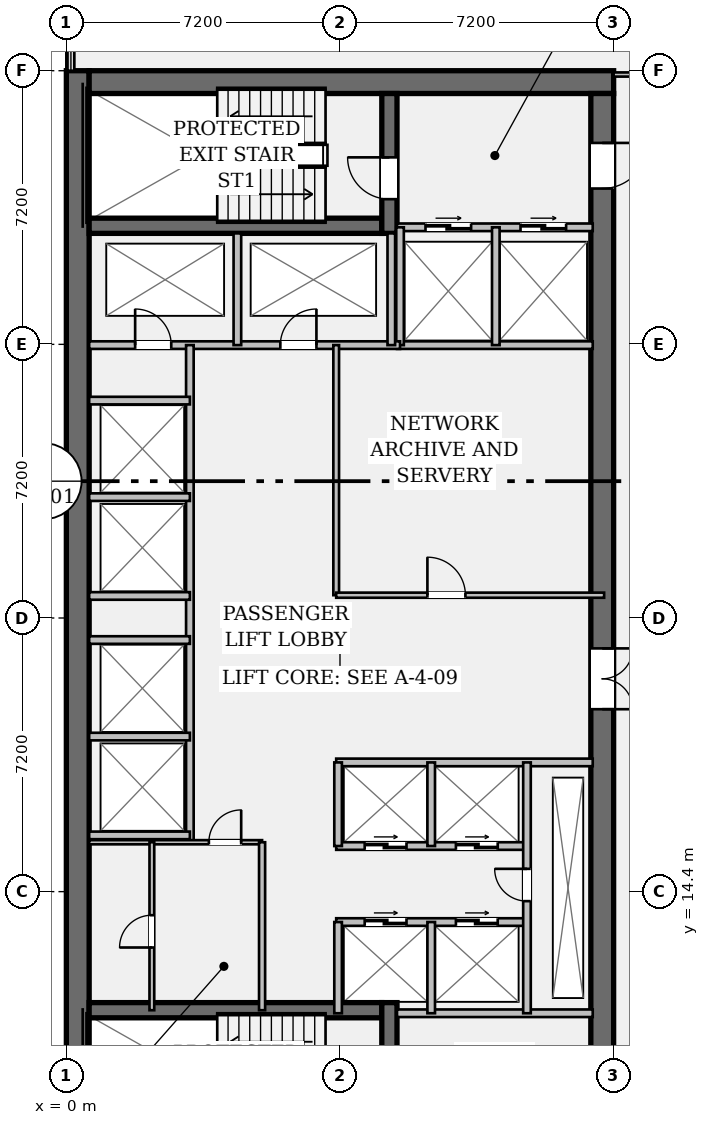
"""IFC4 building model, lengths in metres.
Left out: names, types, materials, properties, quantities, classifications, styles, units other than length and angle.
Written with IfcOpenShell. Run it as: python <this file> out.ifc"""

import sys

from ifc_helpers import new_model, si_unit, direction, frame, frame_2d, origin, place, context, subcontext, project, spatial, rectangle, extrude, element, fill, save


model = new_model("IFC4")
c1 = context("Model", 3, precision=1e-05, world=origin(), true_north=direction((0.0, 1.0)))
c2 = subcontext(c1, "Body", "Model", "MODEL_VIEW")
j1 = project(units=[si_unit("LENGTHUNIT", "METRE"), si_unit("PLANEANGLEUNIT", "RADIAN")], contexts=[c1])
p1 = place(None, origin())
s1 = spatial("IfcSite", under=j1, at=p1, CompositionType="ELEMENT")
p2 = place(p1, origin())
s2 = spatial("IfcBuilding", under=s1, at=p2, CompositionType="ELEMENT")
p3 = place(p2, frame((0.0, 0.0, 144.55)))
s3 = spatial("IfcBuildingStorey", under=s2, at=p3, CompositionType="ELEMENT", Elevation=144.55)
p4 = place(p3, frame((0.3, 7.2, 0.0), z_axis=(0.0, 0.0, 1.0), x_axis=(0.0, 1.0, 0.0)))
e1 = element("IfcWall", 1, at=p4, inside=s3, PredefinedType="SHEAR", context=c2, shape_type="SweptSolid", body=[
    extrude(rectangle(XDim=28.8, YDim=0.6, at=frame_2d((14.4, 0.0))), origin(), (0.0, 0.0, 1.0), 3.58),
])
p5 = place(p3, frame((0.6, 35.7, 0.0), z_axis=(0.0, 0.0, 1.0), x_axis=(1.0, 0.0, 0.0)))
e2 = element("IfcWall", 2, at=p5, inside=s3, PredefinedType="SHEAR", context=c2, shape_type="SweptSolid", body=[
    extrude(rectangle(XDim=13.8, YDim=0.6, at=frame_2d((6.9, 0.0))), origin(), (0.0, 0.0, 1.0), 3.58),
])
p6 = place(p3, frame((14.1, 35.4, 0.0), z_axis=(0.0, 0.0, 1.0), x_axis=(0.0, -1.0, 0.0)))
e3 = element("IfcWall", 3, at=p6, inside=s3, PredefinedType="SHEAR", context=c2, shape_type="SweptSolid", body=[
    extrude(rectangle(XDim=27.6, YDim=0.6, at=frame_2d((13.8, 0.0))), origin(), (0.0, 0.0, 1.0), 3.58),
])
p7 = place(p6, frame((1.3, 0.0, 0.0)))
e4 = element("IfcOpeningElement", 4, at=p7, cuts=e3, PredefinedType="OPENING", context=c2, shape_type="SweptSolid", body=[
    extrude(rectangle(XDim=1.2, YDim=2.15, at=frame_2d((0.6, 1.075))), frame((0.0, 0.312, 0.0), z_axis=(0.0, -1.0, 0.0), x_axis=(1.0, 0.0, 0.0)), (0.0, 0.0, 1.0), 0.624),
])
p8 = place(p6, frame((25.25, 0.0, 0.0)))
e5 = element("IfcOpeningElement", 5, at=p8, cuts=e3, PredefinedType="OPENING", context=c2, shape_type="SweptSolid", body=[
    extrude(rectangle(XDim=1.2, YDim=2.15, at=frame_2d((0.6, 1.075))), frame((0.0, 0.312, 0.0), z_axis=(0.0, -1.0, 0.0), x_axis=(1.0, 0.0, 0.0)), (0.0, 0.0, 1.0), 0.624),
])
p9 = place(p6, frame((14.6, 0.0, 0.0)))
e6 = element("IfcOpeningElement", 6, at=p9, cuts=e3, PredefinedType="OPENING", context=c2, shape_type="SweptSolid", body=[
    extrude(rectangle(XDim=1.6, YDim=2.2, at=frame_2d((0.8, 1.1))), frame((0.0, 0.312, 0.0), z_axis=(0.0, -1.0, 0.0), x_axis=(1.0, 0.0, 0.0)), (0.0, 0.0, 1.0), 0.624),
])
for number, where, z_axis, x_axis in (
    (7, (0.6, 31.92, 0.0), (0.0, 0.0, 1.0), (1.0, 0.0, 0.0)),
    (8, (0.6, 11.28, 0.0), (0.0, 0.0, 1.0), (1.0, 0.0, 0.0)),
):
    element("IfcWall", number, at=place(p3, frame(where, z_axis=z_axis, x_axis=x_axis)), inside=s3, PredefinedType="SHEAR", context=c2, shape_type="SweptSolid", body=[
        extrude(rectangle(XDim=7.7, YDim=0.4, at=frame_2d((3.85, 0.0))), origin(), (0.0, 0.0, 1.0), 3.58),
    ])
p10 = place(p3, frame((8.5, 31.72, 0.0), z_axis=(0.0, 0.0, 1.0), x_axis=(0.0, 1.0, 0.0)))
e9 = element("IfcWall", 9, at=p10, inside=s3, PredefinedType="SHEAR", context=c2, shape_type="SweptSolid", body=[
    extrude(rectangle(XDim=3.68, YDim=0.4, at=frame_2d((1.84, 0.0))), origin(), (0.0, 0.0, 1.0), 3.58),
])
p11 = place(p10, frame((0.9, 0.0, 0.0)))
e10 = element("IfcOpeningElement", 10, at=p11, cuts=e9, PredefinedType="OPENING", context=c2, shape_type="SweptSolid", body=[
    extrude(rectangle(XDim=1.1, YDim=2.15, at=frame_2d((0.55, 1.075))), frame((0.0, 0.212, 0.0), z_axis=(0.0, -1.0, 0.0), x_axis=(1.0, 0.0, 0.0)), (0.0, 0.0, 1.0), 0.424),
])
p12 = place(p3, frame((8.5, 7.8, 0.0), z_axis=(0.0, 0.0, 1.0), x_axis=(0.0, 1.0, 0.0)))
e11 = element("IfcWall", 11, at=p12, inside=s3, PredefinedType="SHEAR", context=c2, shape_type="SweptSolid", body=[
    extrude(rectangle(XDim=3.68, YDim=0.4, at=frame_2d((1.84, 0.0))), origin(), (0.0, 0.0, 1.0), 3.58),
])
p13 = place(p12, frame((0.85, 0.0, 0.0)))
e12 = element("IfcOpeningElement", 12, at=p13, cuts=e11, PredefinedType="OPENING", context=c2, shape_type="SweptSolid", body=[
    extrude(rectangle(XDim=1.1, YDim=2.15, at=frame_2d((0.55, 1.075))), frame((0.0, 0.212, 0.0), z_axis=(0.0, -1.0, 0.0), x_axis=(1.0, 0.0, 0.0)), (0.0, 0.0, 1.0), 0.424),
])
p14 = place(p3, frame((8.7, 31.88, 0.0), z_axis=(0.0, 0.0, 1.0), x_axis=(1.0, 0.0, 0.0)))
e13 = element("IfcWall", 13, at=p14, inside=s3, PredefinedType="PARTITIONING", context=c2, shape_type="SweptSolid", body=[
    extrude(rectangle(XDim=5.15, YDim=0.2, at=frame_2d((2.575, 0.0))), origin(), (0.0, 0.0, 1.0), 3.58),
])
p15 = place(p14, frame((0.75, 0.0, 0.0)))
e14 = element("IfcOpeningElement", 14, at=p15, cuts=e13, PredefinedType="OPENING", context=c2, shape_type="SweptSolid", body=[
    extrude(rectangle(XDim=1.2, YDim=2.2, at=frame_2d((0.6, 1.1))), frame((0.0, 0.112, 0.0), z_axis=(0.0, -1.0, 0.0), x_axis=(1.0, 0.0, 0.0)), (0.0, 0.0, 1.0), 0.224),
])
p16 = place(p14, frame((3.25, 0.0, 0.0)))
e15 = element("IfcOpeningElement", 15, at=p16, cuts=e13, PredefinedType="OPENING", context=c2, shape_type="SweptSolid", body=[
    extrude(rectangle(XDim=1.2, YDim=2.2, at=frame_2d((0.6, 1.1))), frame((0.0, 0.112, 0.0), z_axis=(0.0, -1.0, 0.0), x_axis=(1.0, 0.0, 0.0)), (0.0, 0.0, 1.0), 0.224),
])
for number, where, z_axis, x_axis in (
    (16, (8.7, 11.2, 0.0), (0.0, 0.0, 1.0), (1.0, 0.0, 0.0)),
    (17, (8.7, 28.78, 0.0), (0.0, 0.0, 1.0), (1.0, 0.0, 0.0)),
):
    element("IfcWall", number, at=place(p3, frame(where, z_axis=z_axis, x_axis=x_axis)), inside=s3, PredefinedType="PARTITIONING", context=c2, shape_type="SweptSolid", body=[
        extrude(rectangle(XDim=5.15, YDim=0.2, at=frame_2d((2.575, 0.0))), origin(), (0.0, 0.0, 1.0), 3.58),
    ])
for number, where, z_axis, x_axis in (
    (18, (8.78, 28.78, 0.0), (0.0, 0.0, 1.0), (0.0, 1.0, 0.0)),
    (19, (11.3, 28.78, 0.0), (0.0, 0.0, 1.0), (0.0, 1.0, 0.0)),
):
    element("IfcWall", number, at=place(p3, frame(where, z_axis=z_axis, x_axis=x_axis)), inside=s3, PredefinedType="PARTITIONING", context=c2, shape_type="SweptSolid", body=[
        extrude(rectangle(XDim=3.1, YDim=0.2, at=frame_2d((1.55, 0.0))), origin(), (0.0, 0.0, 1.0), 3.58),
    ])
p17 = place(p3, frame((0.6, 28.78, 0.0), z_axis=(0.0, 0.0, 1.0), x_axis=(1.0, 0.0, 0.0)))
e20 = element("IfcWall", 20, at=p17, inside=s3, PredefinedType="PARTITIONING", context=c2, shape_type="SweptSolid", body=[
    extrude(rectangle(XDim=8.18, YDim=0.2, at=frame_2d((4.09, 0.0))), origin(), (0.0, 0.0, 1.0), 3.58),
])
p18 = place(p17, frame((1.21, 0.0, 0.0)))
e21 = element("IfcOpeningElement", 21, at=p18, cuts=e20, PredefinedType="OPENING", context=c2, shape_type="SweptSolid", body=[
    extrude(rectangle(XDim=0.95, YDim=2.15, at=frame_2d((0.475, 1.075))), frame((0.0, 0.112, 0.0), z_axis=(0.0, -1.0, 0.0), x_axis=(1.0, 0.0, 0.0)), (0.0, 0.0, 1.0), 0.224),
])
p19 = place(p17, frame((5.03, 0.0, 0.0)))
e22 = element("IfcOpeningElement", 22, at=p19, cuts=e20, PredefinedType="OPENING", context=c2, shape_type="SweptSolid", body=[
    extrude(rectangle(XDim=0.95, YDim=2.15, at=frame_2d((0.475, 1.075))), frame((0.0, 0.112, 0.0), z_axis=(0.0, -1.0, 0.0), x_axis=(1.0, 0.0, 0.0)), (0.0, 0.0, 1.0), 0.224),
])
for number, where, z_axis, x_axis in (
    (23, (4.5, 28.78, 0.0), (0.0, 0.0, 1.0), (0.0, 1.0, 0.0)),
    (24, (8.55, 28.78, 0.0), (0.0, 0.0, 1.0), (0.0, 1.0, 0.0)),
):
    element("IfcWall", number, at=place(p3, frame(where, z_axis=z_axis, x_axis=x_axis)), inside=s3, PredefinedType="PARTITIONING", context=c2, shape_type="SweptSolid", body=[
        extrude(rectangle(XDim=2.94, YDim=0.2, at=frame_2d((1.47, 0.0))), origin(), (0.0, 0.0, 1.0), 3.58),
    ])
p20 = place(p3, frame((3.25, 15.7, 0.0), z_axis=(0.0, 0.0, 1.0), x_axis=(0.0, 1.0, 0.0)))
e25 = element("IfcWall", 25, at=p20, inside=s3, PredefinedType="PARTITIONING", context=c2, shape_type="SweptSolid", body=[
    extrude(rectangle(XDim=13.08, YDim=0.2, at=frame_2d((6.54, 0.0))), origin(), (0.0, 0.0, 1.0), 3.58),
])
for number, where, z_axis, x_axis in (
    (26, (0.6, 15.88, 0.0), (0.0, 0.0, 1.0), (1.0, 0.0, 0.0)),
    (27, (0.6, 18.48, 0.0), (0.0, 0.0, 1.0), (1.0, 0.0, 0.0)),
    (28, (0.6, 22.18, 0.0), (0.0, 0.0, 1.0), (1.0, 0.0, 0.0)),
    (29, (0.6, 24.78, 0.0), (0.0, 0.0, 1.0), (1.0, 0.0, 0.0)),
    (30, (0.6, 21.02, 0.0), (0.0, 0.0, 1.0), (1.0, 0.0, 0.0)),
    (31, (0.6, 27.32, 0.0), (0.0, 0.0, 1.0), (1.0, 0.0, 0.0)),
):
    element("IfcWall", number, at=place(p3, frame(where, z_axis=z_axis, x_axis=x_axis)), inside=s3, PredefinedType="PARTITIONING", context=c2, shape_type="SweptSolid", body=[
        extrude(rectangle(XDim=2.65, YDim=0.2, at=frame_2d((1.325, 0.0))), origin(), (0.0, 0.0, 1.0), 3.58),
    ])
p21 = place(p3, frame((7.1, 22.2, 0.0), z_axis=(0.0, 0.0, 1.0), x_axis=(0.0, 1.0, 0.0)))
e32 = element("IfcWall", 32, at=p21, inside=s3, PredefinedType="PARTITIONING", context=c2, shape_type="SweptSolid", body=[
    extrude(rectangle(XDim=6.58, YDim=0.15, at=frame_2d((3.29, 0.0))), origin(), (0.0, 0.0, 1.0), 3.58),
])
p22 = place(p3, frame((7.1, 22.2, 0.0), z_axis=(0.0, 0.0, 1.0), x_axis=(1.0, 0.0, 0.0)))
e33 = element("IfcWall", 33, at=p22, inside=s3, PredefinedType="PARTITIONING", context=c2, shape_type="SweptSolid", body=[
    extrude(rectangle(XDim=7.05, YDim=0.135, at=frame_2d((3.525, 0.0))), origin(), (0.0, 0.0, 1.0), 3.58),
])
p23 = place(p22, frame((2.4, 0.0, 0.0)))
e34 = element("IfcOpeningElement", 34, at=p23, cuts=e33, PredefinedType="OPENING", context=c2, shape_type="SweptSolid", body=[
    extrude(rectangle(XDim=1.0, YDim=2.15, at=frame_2d((0.5, 1.075))), frame((0.0, 0.08, 0.0), z_axis=(0.0, -1.0, 0.0), x_axis=(1.0, 0.0, 0.0)), (0.0, 0.0, 1.0), 0.159),
])
p24 = place(p3, frame((7.1, 17.8, 0.0), z_axis=(0.0, 0.0, 1.0), x_axis=(1.0, 0.0, 0.0)))
e35 = element("IfcWall", 35, at=p24, inside=s3, PredefinedType="PARTITIONING", context=c2, shape_type="SweptSolid", body=[
    extrude(rectangle(XDim=6.75, YDim=0.2, at=frame_2d((3.375, 0.0))), origin(), (0.0, 0.0, 1.0), 3.58),
])
p25 = place(p3, frame((7.1, 15.6, 0.0), z_axis=(0.0, 0.0, 1.0), x_axis=(1.0, 0.0, 0.0)))
e36 = element("IfcWall", 36, at=p25, inside=s3, PredefinedType="PARTITIONING", context=c2, shape_type="SweptSolid", body=[
    extrude(rectangle(XDim=5.02, YDim=0.2, at=frame_2d((2.51, 0.0))), origin(), (0.0, 0.0, 1.0), 3.58),
])
p26 = place(p25, frame((0.75, 0.0, 0.0)))
e37 = element("IfcOpeningElement", 37, at=p26, cuts=e36, PredefinedType="OPENING", context=c2, shape_type="SweptSolid", body=[
    extrude(rectangle(XDim=1.1, YDim=2.2, at=frame_2d((0.55, 1.1))), frame((0.0, 0.112, 0.0), z_axis=(0.0, -1.0, 0.0), x_axis=(1.0, 0.0, 0.0)), (0.0, 0.0, 1.0), 0.224),
])
p27 = place(p25, frame((3.15, 0.0, 0.0)))
e38 = element("IfcOpeningElement", 38, at=p27, cuts=e36, PredefinedType="OPENING", context=c2, shape_type="SweptSolid", body=[
    extrude(rectangle(XDim=1.1, YDim=2.2, at=frame_2d((0.55, 1.1))), frame((0.0, 0.112, 0.0), z_axis=(0.0, -1.0, 0.0), x_axis=(1.0, 0.0, 0.0)), (0.0, 0.0, 1.0), 0.224),
])
p28 = place(p3, frame((7.1, 13.6, 0.0), z_axis=(0.0, 0.0, 1.0), x_axis=(1.0, 0.0, 0.0)))
e39 = element("IfcWall", 39, at=p28, inside=s3, PredefinedType="PARTITIONING", context=c2, shape_type="SweptSolid", body=[
    extrude(rectangle(XDim=5.02, YDim=0.2, at=frame_2d((2.51, 0.0))), origin(), (0.0, 0.0, 1.0), 3.58),
])
p29 = place(p28, frame((0.75, 0.0, 0.0)))
e40 = element("IfcOpeningElement", 40, at=p29, cuts=e39, PredefinedType="OPENING", context=c2, shape_type="SweptSolid", body=[
    extrude(rectangle(XDim=1.1, YDim=2.2, at=frame_2d((0.55, 1.1))), frame((0.0, 0.112, 0.0), z_axis=(0.0, -1.0, 0.0), x_axis=(1.0, 0.0, 0.0)), (0.0, 0.0, 1.0), 0.224),
])
p30 = place(p28, frame((3.15, 0.0, 0.0)))
e41 = element("IfcOpeningElement", 41, at=p30, cuts=e39, PredefinedType="OPENING", context=c2, shape_type="SweptSolid", body=[
    extrude(rectangle(XDim=1.1, YDim=2.2, at=frame_2d((0.55, 1.1))), frame((0.0, 0.112, 0.0), z_axis=(0.0, -1.0, 0.0), x_axis=(1.0, 0.0, 0.0)), (0.0, 0.0, 1.0), 0.224),
])
p31 = place(p3, frame((7.15, 15.6, 0.0), z_axis=(0.0, 0.0, 1.0), x_axis=(0.0, 1.0, 0.0)))
e42 = element("IfcWall", 42, at=p31, inside=s3, PredefinedType="PARTITIONING", context=c2, shape_type="SweptSolid", body=[
    extrude(rectangle(XDim=2.2, YDim=0.2, at=frame_2d((1.1, 0.0))), origin(), (0.0, 0.0, 1.0), 3.58),
])
p32 = place(p3, frame((7.15, 11.2, 0.0), z_axis=(0.0, 0.0, 1.0), x_axis=(0.0, 1.0, 0.0)))
e43 = element("IfcWall", 43, at=p32, inside=s3, PredefinedType="PARTITIONING", context=c2, shape_type="SweptSolid", body=[
    extrude(rectangle(XDim=2.4, YDim=0.2, at=frame_2d((1.2, 0.0))), origin(), (0.0, 0.0, 1.0), 3.58),
])
p33 = place(p3, frame((9.6, 15.6, 0.0), z_axis=(0.0, 0.0, 1.0), x_axis=(0.0, 1.0, 0.0)))
e44 = element("IfcWall", 44, at=p33, inside=s3, PredefinedType="PARTITIONING", context=c2, shape_type="SweptSolid", body=[
    extrude(rectangle(XDim=2.2, YDim=0.2, at=frame_2d((1.1, 0.0))), origin(), (0.0, 0.0, 1.0), 3.58),
])
p34 = place(p3, frame((9.6, 11.2, 0.0), z_axis=(0.0, 0.0, 1.0), x_axis=(0.0, 1.0, 0.0)))
e45 = element("IfcWall", 45, at=p34, inside=s3, PredefinedType="PARTITIONING", context=c2, shape_type="SweptSolid", body=[
    extrude(rectangle(XDim=2.4, YDim=0.2, at=frame_2d((1.2, 0.0))), origin(), (0.0, 0.0, 1.0), 3.58),
])
p35 = place(p3, frame((12.12, 11.2, 0.0), z_axis=(0.0, 0.0, 1.0), x_axis=(0.0, 1.0, 0.0)))
e46 = element("IfcWall", 46, at=p35, inside=s3, PredefinedType="PARTITIONING", context=c2, shape_type="SweptSolid", body=[
    extrude(rectangle(XDim=6.6, YDim=0.2, at=frame_2d((3.3, 0.0))), origin(), (0.0, 0.0, 1.0), 3.58),
])
p36 = place(p35, frame((2.95, 0.0, 0.0)))
e47 = element("IfcOpeningElement", 47, at=p36, cuts=e46, PredefinedType="OPENING", context=c2, shape_type="SweptSolid", body=[
    extrude(rectangle(XDim=0.85, YDim=2.15, at=frame_2d((0.425, 1.075))), frame((0.0, 0.112, 0.0), z_axis=(0.0, -1.0, 0.0), x_axis=(1.0, 0.0, 0.0)), (0.0, 0.0, 1.0), 0.224),
])
p37 = place(p3, frame((0.6, 15.7, 0.0), z_axis=(0.0, 0.0, 1.0), x_axis=(1.0, 0.0, 0.0)))
e48 = element("IfcWall", 48, at=p37, inside=s3, PredefinedType="PARTITIONING", context=c2, shape_type="SweptSolid", body=[
    extrude(rectangle(XDim=4.55, YDim=0.11, at=frame_2d((2.275, 0.0))), origin(), (0.0, 0.0, 1.0), 3.58),
])
p38 = place(p37, frame((3.15, 0.0, 0.0)))
e49 = element("IfcOpeningElement", 49, at=p38, cuts=e48, PredefinedType="OPENING", context=c2, shape_type="SweptSolid", body=[
    extrude(rectangle(XDim=0.85, YDim=2.15, at=frame_2d((0.425, 1.075))), frame((0.0, 0.067, 0.0), z_axis=(0.0, -1.0, 0.0), x_axis=(1.0, 0.0, 0.0)), (0.0, 0.0, 1.0), 0.134),
])
p39 = place(p3, frame((5.15, 11.28, 0.0), z_axis=(0.0, 0.0, 1.0), x_axis=(0.0, 1.0, 0.0)))
e50 = element("IfcWall", 50, at=p39, inside=s3, PredefinedType="PARTITIONING", context=c2, shape_type="SweptSolid", body=[
    extrude(rectangle(XDim=4.42, YDim=0.16, at=frame_2d((2.21, 0.0))), origin(), (0.0, 0.0, 1.0), 3.58),
])
p40 = place(p3, frame((2.25, 11.28, 0.0), z_axis=(0.0, 0.0, 1.0), x_axis=(0.0, 1.0, 0.0)))
e51 = element("IfcWall", 51, at=p40, inside=s3, PredefinedType="PARTITIONING", context=c2, shape_type="SweptSolid", body=[
    extrude(rectangle(XDim=4.42, YDim=0.125, at=frame_2d((2.21, 0.0))), origin(), (0.0, 0.0, 1.0), 3.58),
])
p41 = place(p40, frame((1.65, 0.0, 0.0)))
e52 = element("IfcOpeningElement", 52, at=p41, cuts=e51, PredefinedType="OPENING", context=c2, shape_type="SweptSolid", body=[
    extrude(rectangle(XDim=0.85, YDim=2.15, at=frame_2d((0.425, 1.075))), frame((0.0, 0.074, 0.0), z_axis=(0.0, -1.0, 0.0), x_axis=(1.0, 0.0, 0.0)), (0.0, 0.0, 1.0), 0.149),
])
p42 = place(p3, frame((14.4, 35.9, 0.0), z_axis=(0.0, 0.0, 1.0), x_axis=(1.0, 0.0, 0.0)))
e53 = element("IfcWall", 53, at=p42, inside=s3, PredefinedType="PARTITIONING", context=c2, shape_type="SweptSolid", body=[
    extrude(rectangle(XDim=2.95, YDim=0.11, at=frame_2d((1.475, 0.0))), origin(), (0.0, 0.0, 1.0), 2.869),
])
p43 = place(p42, frame((0.95, 0.0, 0.0)))
e54 = element("IfcOpeningElement", 54, at=p43, cuts=e53, PredefinedType="OPENING", context=c2, shape_type="SweptSolid", body=[
    extrude(rectangle(XDim=1.0, YDim=2.15, at=frame_2d((0.5, 1.075))), frame((0.0, 0.067, 0.0), z_axis=(0.0, -1.0, 0.0), x_axis=(1.0, 0.0, 0.0)), (0.0, 0.0, 1.0), 0.134),
])
p44 = place(p11, origin())
e55 = element("IfcDoor", 55, at=p44, inside=s3, OperationType="SINGLE_SWING_RIGHT", PredefinedType="DOOR", context=c2, shape_type="SweptSolid", body=[
    extrude(rectangle(XDim=1.1, YDim=2.15, at=frame_2d((0.55, 1.075))), frame((0.0, 0.025, 0.0), z_axis=(0.0, -1.0, 0.0), x_axis=(1.0, 0.0, 0.0)), (0.0, 0.0, 1.0), 0.05),
])
fill(e10, e55)
p45 = place(p7, origin())
e56 = element("IfcDoor", 56, at=p45, inside=s3, OperationType="SINGLE_SWING_LEFT", PredefinedType="DOOR", context=c2, shape_type="SweptSolid", body=[
    extrude(rectangle(XDim=1.2, YDim=2.15, at=frame_2d((0.6, 1.075))), frame((0.0, 0.025, 0.0), z_axis=(0.0, -1.0, 0.0), x_axis=(1.0, 0.0, 0.0)), (0.0, 0.0, 1.0), 0.05),
])
fill(e4, e56)
p46 = place(p15, origin())
e57 = element("IfcDoor", 57, at=p46, inside=s3, OperationType="DOUBLE_DOOR_SLIDING", PredefinedType="DOOR", context=c2, shape_type="SweptSolid", body=[
    extrude(rectangle(XDim=1.2, YDim=2.2, at=frame_2d((0.6, 1.1))), frame((0.0, 0.025, 0.0), z_axis=(0.0, -1.0, 0.0), x_axis=(1.0, 0.0, 0.0)), (0.0, 0.0, 1.0), 0.05),
])
fill(e14, e57)
p47 = place(p16, origin())
e58 = element("IfcDoor", 58, at=p47, inside=s3, OperationType="DOUBLE_DOOR_SLIDING", PredefinedType="DOOR", context=c2, shape_type="SweptSolid", body=[
    extrude(rectangle(XDim=1.2, YDim=2.2, at=frame_2d((0.6, 1.1))), frame((0.0, 0.025, 0.0), z_axis=(0.0, -1.0, 0.0), x_axis=(1.0, 0.0, 0.0)), (0.0, 0.0, 1.0), 0.05),
])
fill(e15, e58)
p48 = place(p18, origin())
e59 = element("IfcDoor", 59, at=p48, inside=s3, OperationType="SINGLE_SWING_LEFT", PredefinedType="DOOR", context=c2, shape_type="SweptSolid", body=[
    extrude(rectangle(XDim=0.95, YDim=2.15, at=frame_2d((0.475, 1.075))), frame((0.0, 0.025, 0.0), z_axis=(0.0, -1.0, 0.0), x_axis=(1.0, 0.0, 0.0)), (0.0, 0.0, 1.0), 0.05),
])
fill(e21, e59)
p49 = place(p19, origin())
e60 = element("IfcDoor", 60, at=p49, inside=s3, OperationType="SINGLE_SWING_RIGHT", PredefinedType="DOOR", context=c2, shape_type="SweptSolid", body=[
    extrude(rectangle(XDim=0.95, YDim=2.15, at=frame_2d((0.475, 1.075))), frame((0.0, 0.025, 0.0), z_axis=(0.0, -1.0, 0.0), x_axis=(1.0, 0.0, 0.0)), (0.0, 0.0, 1.0), 0.05),
])
fill(e22, e60)
p50 = place(p9, origin())
e61 = element("IfcDoor", 61, at=p50, inside=s3, OperationType="DOUBLE_DOOR_SINGLE_SWING", PredefinedType="DOOR", context=c2, shape_type="SweptSolid", body=[
    extrude(rectangle(XDim=1.6, YDim=2.2, at=frame_2d((0.8, 1.1))), frame((0.0, 0.025, 0.0), z_axis=(0.0, -1.0, 0.0), x_axis=(1.0, 0.0, 0.0)), (0.0, 0.0, 1.0), 0.05),
])
fill(e6, e61)
p51 = place(p23, origin())
e62 = element("IfcDoor", 62, at=p51, inside=s3, OperationType="SINGLE_SWING_LEFT", PredefinedType="DOOR", context=c2, shape_type="SweptSolid", body=[
    extrude(rectangle(XDim=1.0, YDim=2.15, at=frame_2d((0.5, 1.075))), frame((0.0, 0.025, 0.0), z_axis=(0.0, -1.0, 0.0), x_axis=(1.0, 0.0, 0.0)), (0.0, 0.0, 1.0), 0.05),
])
fill(e34, e62)
p52 = place(p36, origin())
e63 = element("IfcDoor", 63, at=p52, inside=s3, OperationType="SINGLE_SWING_RIGHT", PredefinedType="DOOR", context=c2, shape_type="SweptSolid", body=[
    extrude(rectangle(XDim=0.85, YDim=2.15, at=frame_2d((0.425, 1.075))), frame((0.0, 0.025, 0.0), z_axis=(0.0, -1.0, 0.0), x_axis=(1.0, 0.0, 0.0)), (0.0, 0.0, 1.0), 0.05),
])
fill(e47, e63)
p53 = place(p26, origin())
e64 = element("IfcDoor", 64, at=p53, inside=s3, OperationType="DOUBLE_DOOR_SLIDING", PredefinedType="DOOR", context=c2, shape_type="SweptSolid", body=[
    extrude(rectangle(XDim=1.1, YDim=2.2, at=frame_2d((0.55, 1.1))), frame((0.0, 0.025, 0.0), z_axis=(0.0, -1.0, 0.0), x_axis=(1.0, 0.0, 0.0)), (0.0, 0.0, 1.0), 0.05),
])
fill(e37, e64)
p54 = place(p27, origin())
e65 = element("IfcDoor", 65, at=p54, inside=s3, OperationType="DOUBLE_DOOR_SLIDING", PredefinedType="DOOR", context=c2, shape_type="SweptSolid", body=[
    extrude(rectangle(XDim=1.1, YDim=2.2, at=frame_2d((0.55, 1.1))), frame((0.0, 0.025, 0.0), z_axis=(0.0, -1.0, 0.0), x_axis=(1.0, 0.0, 0.0)), (0.0, 0.0, 1.0), 0.05),
])
fill(e38, e65)
p55 = place(p29, origin())
e66 = element("IfcDoor", 66, at=p55, inside=s3, OperationType="DOUBLE_DOOR_SLIDING", PredefinedType="DOOR", context=c2, shape_type="SweptSolid", body=[
    extrude(rectangle(XDim=1.1, YDim=2.2, at=frame_2d((0.55, 1.1))), frame((0.0, 0.025, 0.0), z_axis=(0.0, -1.0, 0.0), x_axis=(1.0, 0.0, 0.0)), (0.0, 0.0, 1.0), 0.05),
])
fill(e40, e66)
p56 = place(p30, origin())
e67 = element("IfcDoor", 67, at=p56, inside=s3, OperationType="DOUBLE_DOOR_SLIDING", PredefinedType="DOOR", context=c2, shape_type="SweptSolid", body=[
    extrude(rectangle(XDim=1.1, YDim=2.2, at=frame_2d((0.55, 1.1))), frame((0.0, 0.025, 0.0), z_axis=(0.0, -1.0, 0.0), x_axis=(1.0, 0.0, 0.0)), (0.0, 0.0, 1.0), 0.05),
])
fill(e41, e67)
p57 = place(p38, origin())
e68 = element("IfcDoor", 68, at=p57, inside=s3, OperationType="SINGLE_SWING_RIGHT", PredefinedType="DOOR", context=c2, shape_type="SweptSolid", body=[
    extrude(rectangle(XDim=0.85, YDim=2.15, at=frame_2d((0.425, 1.075))), frame((0.0, 0.025, 0.0), z_axis=(0.0, -1.0, 0.0), x_axis=(1.0, 0.0, 0.0)), (0.0, 0.0, 1.0), 0.05),
])
fill(e49, e68)
p58 = place(p41, origin())
e69 = element("IfcDoor", 69, at=p58, inside=s3, OperationType="SINGLE_SWING_LEFT", PredefinedType="DOOR", context=c2, shape_type="SweptSolid", body=[
    extrude(rectangle(XDim=0.85, YDim=2.15, at=frame_2d((0.425, 1.075))), frame((0.0, 0.025, 0.0), z_axis=(0.0, -1.0, 0.0), x_axis=(1.0, 0.0, 0.0)), (0.0, 0.0, 1.0), 0.05),
])
fill(e52, e69)
save(model, sys.argv[1])
